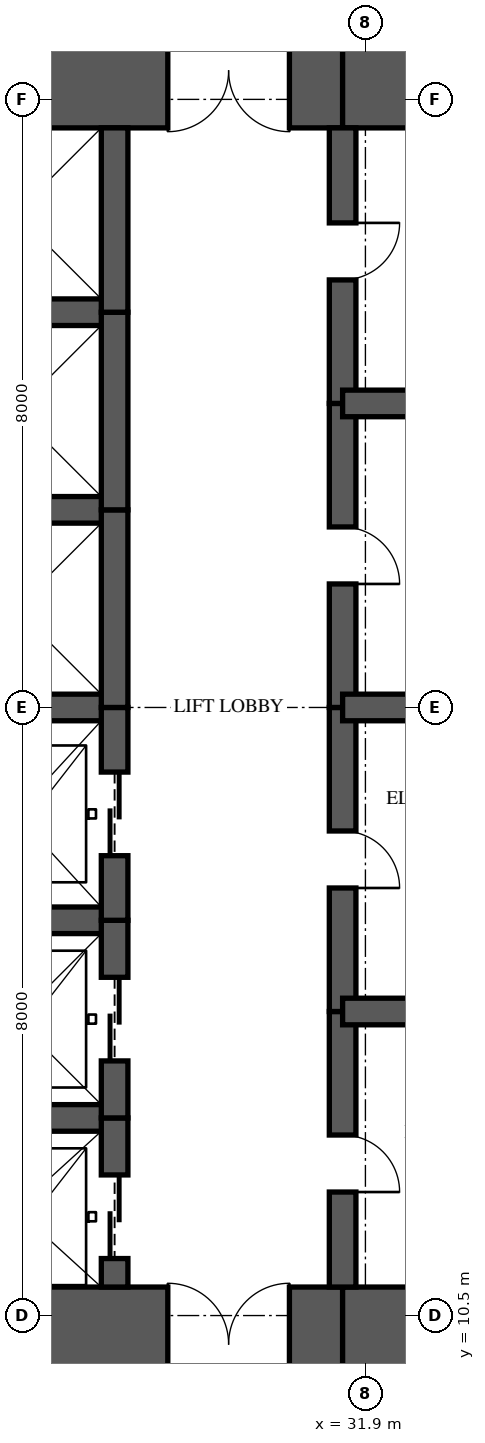
"""IFC4 building model, lengths in metres.
Left out: names, types, materials, properties, quantities, classifications, styles, units other than length and angle.
Written with IfcOpenShell. Run it as: python <this file> out.ifc"""

import sys

from ifc_helpers import new_model, si_unit, direction, frame, frame_2d, origin, place, context, subcontext, project, spatial, rectangle, extrude, element, fill, save


model = new_model("IFC4")
c1 = context("Model", 3, precision=1e-05, world=origin(), true_north=direction((0.0, 1.0)))
c2 = subcontext(c1, "Body", "Model", "MODEL_VIEW")
j1 = project(units=[si_unit("LENGTHUNIT", "METRE"), si_unit("PLANEANGLEUNIT", "RADIAN")], contexts=[c1])
p1 = place(None, origin())
s1 = spatial("IfcSite", under=j1, at=p1, CompositionType="ELEMENT")
p2 = place(p1, origin())
s2 = spatial("IfcBuilding", under=s1, at=p2, CompositionType="ELEMENT")
p3 = place(p2, frame((0.0, 0.0, 104.85)))
s3 = spatial("IfcBuildingStorey", under=s2, at=p3, CompositionType="ELEMENT", Elevation=104.85)
p4 = place(p3, frame((26.0, 10.125, 0.0), z_axis=(0.0, 0.0, 1.0), x_axis=(1.0, 0.0, 0.0)))
e1 = element("IfcWall", 1, at=p4, inside=s3, PredefinedType="SHEAR", context=c2, shape_type="SweptSolid", body=[
    extrude(rectangle(XDim=5.6, YDim=1.5, at=frame_2d((2.8, 0.0))), origin(), (0.0, 0.0, 1.0), 3.35),
])
p5 = place(p4, frame((3.3, 0.0, 0.0)))
e2 = element("IfcOpeningElement", 2, at=p5, cuts=e1, PredefinedType="OPENING", context=c2, shape_type="SweptSolid", body=[
    extrude(rectangle(XDim=1.6, YDim=2.1, at=frame_2d((0.8, 1.05))), frame((0.0, 0.76, 0.0), z_axis=(0.0, -1.0, 0.0), x_axis=(1.0, 0.0, 0.0)), (0.0, 0.0, 1.0), 1.52),
])
for number, where, z_axis, x_axis in (
    (3, (31.6, 10.125, 0.0), (0.0, 0.0, 1.0), (1.0, 0.0, 0.0)),
    (4, (35.9, 26.875, 0.0), (0.0, 0.0, 1.0), (-1.0, 0.0, 0.0)),
):
    element("IfcWall", number, at=place(p3, frame(where, z_axis=z_axis, x_axis=x_axis)), inside=s3, PredefinedType="SHEAR", context=c2, shape_type="SweptSolid", body=[
        extrude(rectangle(XDim=4.3, YDim=1.5, at=frame_2d((2.15, 0.0))), origin(), (0.0, 0.0, 1.0), 3.35),
    ])
p6 = place(p3, frame((31.6, 26.875, 0.0), z_axis=(0.0, 0.0, 1.0), x_axis=(-1.0, 0.0, 0.0)))
e5 = element("IfcWall", 5, at=p6, inside=s3, PredefinedType="SHEAR", context=c2, shape_type="SweptSolid", body=[
    extrude(rectangle(XDim=5.6, YDim=1.5, at=frame_2d((2.8, 0.0))), origin(), (0.0, 0.0, 1.0), 3.35),
])
p7 = place(p6, frame((0.7, 0.0, 0.0)))
e6 = element("IfcOpeningElement", 6, at=p7, cuts=e5, PredefinedType="OPENING", context=c2, shape_type="SweptSolid", body=[
    extrude(rectangle(XDim=1.6, YDim=2.1, at=frame_2d((0.8, 1.05))), frame((0.0, 0.76, 0.0), z_axis=(0.0, -1.0, 0.0), x_axis=(1.0, 0.0, 0.0)), (0.0, 0.0, 1.0), 1.52),
])
p8 = place(p3, frame((28.6, 10.875, 0.0), z_axis=(0.0, 0.0, 1.0), x_axis=(0.0, 1.0, 0.0)))
e7 = element("IfcWall", 7, at=p8, inside=s3, PredefinedType="SHEAR", context=c2, shape_type="SweptSolid", body=[
    extrude(rectangle(XDim=2.225, YDim=0.35, at=frame_2d((1.113, 0.0))), origin(), (0.0, 0.0, 1.0), 3.35),
])
p9 = place(p8, frame((0.375, 0.0, 0.0)))
e8 = element("IfcOpeningElement", 8, at=p9, cuts=e7, PredefinedType="OPENING", context=c2, shape_type="SweptSolid", body=[
    extrude(rectangle(XDim=1.1, YDim=2.1, at=frame_2d((0.55, 1.05))), frame((0.0, 0.185, 0.0), z_axis=(0.0, -1.0, 0.0), x_axis=(1.0, 0.0, 0.0)), (0.0, 0.0, 1.0), 0.37),
])
p10 = place(p3, frame((28.6, 13.1, 0.0), z_axis=(0.0, 0.0, 1.0), x_axis=(0.0, 1.0, 0.0)))
e9 = element("IfcWall", 9, at=p10, inside=s3, PredefinedType="SHEAR", context=c2, shape_type="SweptSolid", body=[
    extrude(rectangle(XDim=2.6, YDim=0.35, at=frame_2d((1.3, 0.0))), origin(), (0.0, 0.0, 1.0), 3.35),
])
p11 = place(p10, frame((0.75, 0.0, 0.0)))
e10 = element("IfcOpeningElement", 10, at=p11, cuts=e9, PredefinedType="OPENING", context=c2, shape_type="SweptSolid", body=[
    extrude(rectangle(XDim=1.1, YDim=2.1, at=frame_2d((0.55, 1.05))), frame((0.0, 0.185, 0.0), z_axis=(0.0, -1.0, 0.0), x_axis=(1.0, 0.0, 0.0)), (0.0, 0.0, 1.0), 0.37),
])
p12 = place(p3, frame((28.6, 15.7, 0.0), z_axis=(0.0, 0.0, 1.0), x_axis=(0.0, 1.0, 0.0)))
e11 = element("IfcWall", 11, at=p12, inside=s3, PredefinedType="SHEAR", context=c2, shape_type="SweptSolid", body=[
    extrude(rectangle(XDim=2.8, YDim=0.35, at=frame_2d((1.4, 0.0))), origin(), (0.0, 0.0, 1.0), 3.35),
])
p13 = place(p12, frame((0.85, 0.0, 0.0)))
e12 = element("IfcOpeningElement", 12, at=p13, cuts=e11, PredefinedType="OPENING", context=c2, shape_type="SweptSolid", body=[
    extrude(rectangle(XDim=1.1, YDim=2.1, at=frame_2d((0.55, 1.05))), frame((0.0, 0.185, 0.0), z_axis=(0.0, -1.0, 0.0), x_axis=(1.0, 0.0, 0.0)), (0.0, 0.0, 1.0), 0.37),
])
p14 = place(p3, frame((28.6, 18.5, 0.0), z_axis=(0.0, 0.0, 1.0), x_axis=(0.0, 1.0, 0.0)))
e13 = element("IfcWall", 13, at=p14, inside=s3, PredefinedType="SHEAR", context=c2, shape_type="SweptSolid", body=[
    extrude(rectangle(XDim=2.6, YDim=0.35, at=frame_2d((1.3, 0.0))), origin(), (0.0, 0.0, 1.0), 3.35),
])
p15 = place(p3, frame((28.6, 21.1, 0.0), z_axis=(0.0, 0.0, 1.0), x_axis=(0.0, 1.0, 0.0)))
e14 = element("IfcWall", 14, at=p15, inside=s3, PredefinedType="SHEAR", context=c2, shape_type="SweptSolid", body=[
    extrude(rectangle(XDim=2.6, YDim=0.35, at=frame_2d((1.3, 0.0))), origin(), (0.0, 0.0, 1.0), 3.35),
])
p16 = place(p3, frame((28.6, 23.7, 0.0), z_axis=(0.0, 0.0, 1.0), x_axis=(0.0, 1.0, 0.0)))
e15 = element("IfcWall", 15, at=p16, inside=s3, PredefinedType="SHEAR", context=c2, shape_type="SweptSolid", body=[
    extrude(rectangle(XDim=2.425, YDim=0.35, at=frame_2d((1.212, 0.0))), origin(), (0.0, 0.0, 1.0), 3.35),
])
p17 = place(p3, frame((31.6, 10.875, 0.0), z_axis=(0.0, 0.0, 1.0), x_axis=(0.0, 1.0, 0.0)))
e16 = element("IfcWall", 16, at=p17, inside=s3, PredefinedType="SHEAR", context=c2, shape_type="SweptSolid", body=[
    extrude(rectangle(XDim=3.625, YDim=0.35, at=frame_2d((1.812, 0.0))), origin(), (0.0, 0.0, 1.0), 3.35),
])
p18 = place(p17, frame((1.25, 0.0, 0.0)))
e17 = element("IfcOpeningElement", 17, at=p18, cuts=e16, PredefinedType="OPENING", context=c2, shape_type="SweptSolid", body=[
    extrude(rectangle(XDim=0.75, YDim=2.1, at=frame_2d((0.375, 1.05))), frame((0.0, 0.185, 0.0), z_axis=(0.0, -1.0, 0.0), x_axis=(1.0, 0.0, 0.0)), (0.0, 0.0, 1.0), 0.37),
])
p19 = place(p3, frame((31.6, 14.5, 0.0), z_axis=(0.0, 0.0, 1.0), x_axis=(0.0, 1.0, 0.0)))
e18 = element("IfcWall", 18, at=p19, inside=s3, PredefinedType="SHEAR", context=c2, shape_type="SweptSolid", body=[
    extrude(rectangle(XDim=4.0, YDim=0.35, at=frame_2d((2.0, 0.0))), origin(), (0.0, 0.0, 1.0), 3.35),
])
p20 = place(p19, frame((1.625, 0.0, 0.0)))
e19 = element("IfcOpeningElement", 19, at=p20, cuts=e18, PredefinedType="OPENING", context=c2, shape_type="SweptSolid", body=[
    extrude(rectangle(XDim=0.75, YDim=2.1, at=frame_2d((0.375, 1.05))), frame((0.0, 0.185, 0.0), z_axis=(0.0, -1.0, 0.0), x_axis=(1.0, 0.0, 0.0)), (0.0, 0.0, 1.0), 0.37),
])
p21 = place(p3, frame((31.6, 18.5, 0.0), z_axis=(0.0, 0.0, 1.0), x_axis=(0.0, 1.0, 0.0)))
e20 = element("IfcWall", 20, at=p21, inside=s3, PredefinedType="SHEAR", context=c2, shape_type="SweptSolid", body=[
    extrude(rectangle(XDim=4.0, YDim=0.35, at=frame_2d((2.0, 0.0))), origin(), (0.0, 0.0, 1.0), 3.35),
])
p22 = place(p21, frame((1.625, 0.0, 0.0)))
e21 = element("IfcOpeningElement", 21, at=p22, cuts=e20, PredefinedType="OPENING", context=c2, shape_type="SweptSolid", body=[
    extrude(rectangle(XDim=0.75, YDim=2.1, at=frame_2d((0.375, 1.05))), frame((0.0, 0.185, 0.0), z_axis=(0.0, -1.0, 0.0), x_axis=(1.0, 0.0, 0.0)), (0.0, 0.0, 1.0), 0.37),
])
p23 = place(p3, frame((31.6, 22.5, 0.0), z_axis=(0.0, 0.0, 1.0), x_axis=(0.0, 1.0, 0.0)))
e22 = element("IfcWall", 22, at=p23, inside=s3, PredefinedType="SHEAR", context=c2, shape_type="SweptSolid", body=[
    extrude(rectangle(XDim=3.625, YDim=0.35, at=frame_2d((1.812, 0.0))), origin(), (0.0, 0.0, 1.0), 3.35),
])
p24 = place(p23, frame((1.625, 0.0, 0.0)))
e23 = element("IfcOpeningElement", 23, at=p24, cuts=e22, PredefinedType="OPENING", context=c2, shape_type="SweptSolid", body=[
    extrude(rectangle(XDim=0.75, YDim=2.1, at=frame_2d((0.375, 1.05))), frame((0.0, 0.185, 0.0), z_axis=(0.0, -1.0, 0.0), x_axis=(1.0, 0.0, 0.0)), (0.0, 0.0, 1.0), 0.37),
])
for number, where, z_axis, x_axis in (
    (24, (26.0, 13.1, 0.0), (0.0, 0.0, 1.0), (1.0, 0.0, 0.0)),
    (25, (26.0, 15.7, 0.0), (0.0, 0.0, 1.0), (1.0, 0.0, 0.0)),
    (26, (26.0, 18.5, 0.0), (0.0, 0.0, 1.0), (1.0, 0.0, 0.0)),
    (27, (26.0, 21.1, 0.0), (0.0, 0.0, 1.0), (1.0, 0.0, 0.0)),
    (28, (26.0, 23.7, 0.0), (0.0, 0.0, 1.0), (1.0, 0.0, 0.0)),
):
    element("IfcWall", number, at=place(p3, frame(where, z_axis=z_axis, x_axis=x_axis)), inside=s3, PredefinedType="SHEAR", context=c2, shape_type="SweptSolid", body=[
        extrude(rectangle(XDim=2.6, YDim=0.35, at=frame_2d((1.3, 0.0))), origin(), (0.0, 0.0, 1.0), 3.35),
    ])
for number, where, z_axis, x_axis in (
    (29, (31.6, 14.5, 0.0), (0.0, 0.0, 1.0), (1.0, 0.0, 0.0)),
    (30, (31.6, 18.5, 0.0), (0.0, 0.0, 1.0), (1.0, 0.0, 0.0)),
    (31, (31.6, 22.5, 0.0), (0.0, 0.0, 1.0), (1.0, 0.0, 0.0)),
):
    element("IfcWall", number, at=place(p3, frame(where, z_axis=z_axis, x_axis=x_axis)), inside=s3, PredefinedType="SHEAR", context=c2, shape_type="SweptSolid", body=[
        extrude(rectangle(XDim=4.3, YDim=0.35, at=frame_2d((2.15, 0.0))), origin(), (0.0, 0.0, 1.0), 3.35),
    ])
p25 = place(p9, origin())
e32 = element("IfcDoor", 32, at=p25, inside=s3, OperationType="SLIDING_TO_LEFT", PredefinedType="DOOR", context=c2, shape_type="SweptSolid", body=[
    extrude(rectangle(XDim=1.1, YDim=2.1, at=frame_2d((0.55, 1.05))), frame((0.0, 0.025, 0.0), z_axis=(0.0, -1.0, 0.0), x_axis=(1.0, 0.0, 0.0)), (0.0, 0.0, 1.0), 0.05),
])
fill(e8, e32)
p26 = place(p11, origin())
e33 = element("IfcDoor", 33, at=p26, inside=s3, OperationType="SLIDING_TO_LEFT", PredefinedType="DOOR", context=c2, shape_type="SweptSolid", body=[
    extrude(rectangle(XDim=1.1, YDim=2.1, at=frame_2d((0.55, 1.05))), frame((0.0, 0.025, 0.0), z_axis=(0.0, -1.0, 0.0), x_axis=(1.0, 0.0, 0.0)), (0.0, 0.0, 1.0), 0.05),
])
fill(e10, e33)
p27 = place(p13, origin())
e34 = element("IfcDoor", 34, at=p27, inside=s3, OperationType="SLIDING_TO_LEFT", PredefinedType="DOOR", context=c2, shape_type="SweptSolid", body=[
    extrude(rectangle(XDim=1.1, YDim=2.1, at=frame_2d((0.55, 1.05))), frame((0.0, 0.025, 0.0), z_axis=(0.0, -1.0, 0.0), x_axis=(1.0, 0.0, 0.0)), (0.0, 0.0, 1.0), 0.05),
])
fill(e12, e34)
p28 = place(p5, origin())
e35 = element("IfcDoor", 35, at=p28, inside=s3, OperationType="DOUBLE_DOOR_SINGLE_SWING", PredefinedType="DOOR", context=c2, shape_type="SweptSolid", body=[
    extrude(rectangle(XDim=1.6, YDim=2.1, at=frame_2d((0.8, 1.05))), frame((0.0, 0.025, 0.0), z_axis=(0.0, -1.0, 0.0), x_axis=(1.0, 0.0, 0.0)), (0.0, 0.0, 1.0), 0.05),
])
fill(e2, e35)
p29 = place(p7, origin())
e36 = element("IfcDoor", 36, at=p29, inside=s3, OperationType="DOUBLE_DOOR_SINGLE_SWING", PredefinedType="DOOR", context=c2, shape_type="SweptSolid", body=[
    extrude(rectangle(XDim=1.6, YDim=2.1, at=frame_2d((0.8, 1.05))), frame((0.0, 0.025, 0.0), z_axis=(0.0, -1.0, 0.0), x_axis=(1.0, 0.0, 0.0)), (0.0, 0.0, 1.0), 0.05),
])
fill(e6, e36)
p30 = place(p18, frame((0.75, 0.0, 0.0), z_axis=(0.0, 0.0, 1.0), x_axis=(-1.0, 0.0, 0.0)))
e37 = element("IfcDoor", 37, at=p30, inside=s3, OperationType="SINGLE_SWING_RIGHT", PredefinedType="DOOR", context=c2, shape_type="SweptSolid", body=[
    extrude(rectangle(XDim=0.75, YDim=2.1, at=frame_2d((0.375, 1.05))), frame((0.0, 0.025, 0.0), z_axis=(0.0, -1.0, 0.0), x_axis=(1.0, 0.0, 0.0)), (0.0, 0.0, 1.0), 0.05),
])
fill(e17, e37)
p31 = place(p20, frame((0.75, 0.0, 0.0), z_axis=(0.0, 0.0, 1.0), x_axis=(-1.0, 0.0, 0.0)))
e38 = element("IfcDoor", 38, at=p31, inside=s3, OperationType="SINGLE_SWING_RIGHT", PredefinedType="DOOR", context=c2, shape_type="SweptSolid", body=[
    extrude(rectangle(XDim=0.75, YDim=2.1, at=frame_2d((0.375, 1.05))), frame((0.0, 0.025, 0.0), z_axis=(0.0, -1.0, 0.0), x_axis=(1.0, 0.0, 0.0)), (0.0, 0.0, 1.0), 0.05),
])
fill(e19, e38)
p32 = place(p22, frame((0.75, 0.0, 0.0), z_axis=(0.0, 0.0, 1.0), x_axis=(-1.0, 0.0, 0.0)))
e39 = element("IfcDoor", 39, at=p32, inside=s3, OperationType="SINGLE_SWING_RIGHT", PredefinedType="DOOR", context=c2, shape_type="SweptSolid", body=[
    extrude(rectangle(XDim=0.75, YDim=2.1, at=frame_2d((0.375, 1.05))), frame((0.0, 0.025, 0.0), z_axis=(0.0, -1.0, 0.0), x_axis=(1.0, 0.0, 0.0)), (0.0, 0.0, 1.0), 0.05),
])
fill(e21, e39)
p33 = place(p24, frame((0.75, 0.0, 0.0), z_axis=(0.0, 0.0, 1.0), x_axis=(-1.0, 0.0, 0.0)))
e40 = element("IfcDoor", 40, at=p33, inside=s3, OperationType="SINGLE_SWING_LEFT", PredefinedType="DOOR", context=c2, shape_type="SweptSolid", body=[
    extrude(rectangle(XDim=0.75, YDim=2.1, at=frame_2d((0.375, 1.05))), frame((0.0, 0.025, 0.0), z_axis=(0.0, -1.0, 0.0), x_axis=(1.0, 0.0, 0.0)), (0.0, 0.0, 1.0), 0.05),
])
fill(e23, e40)
save(model, sys.argv[1])
